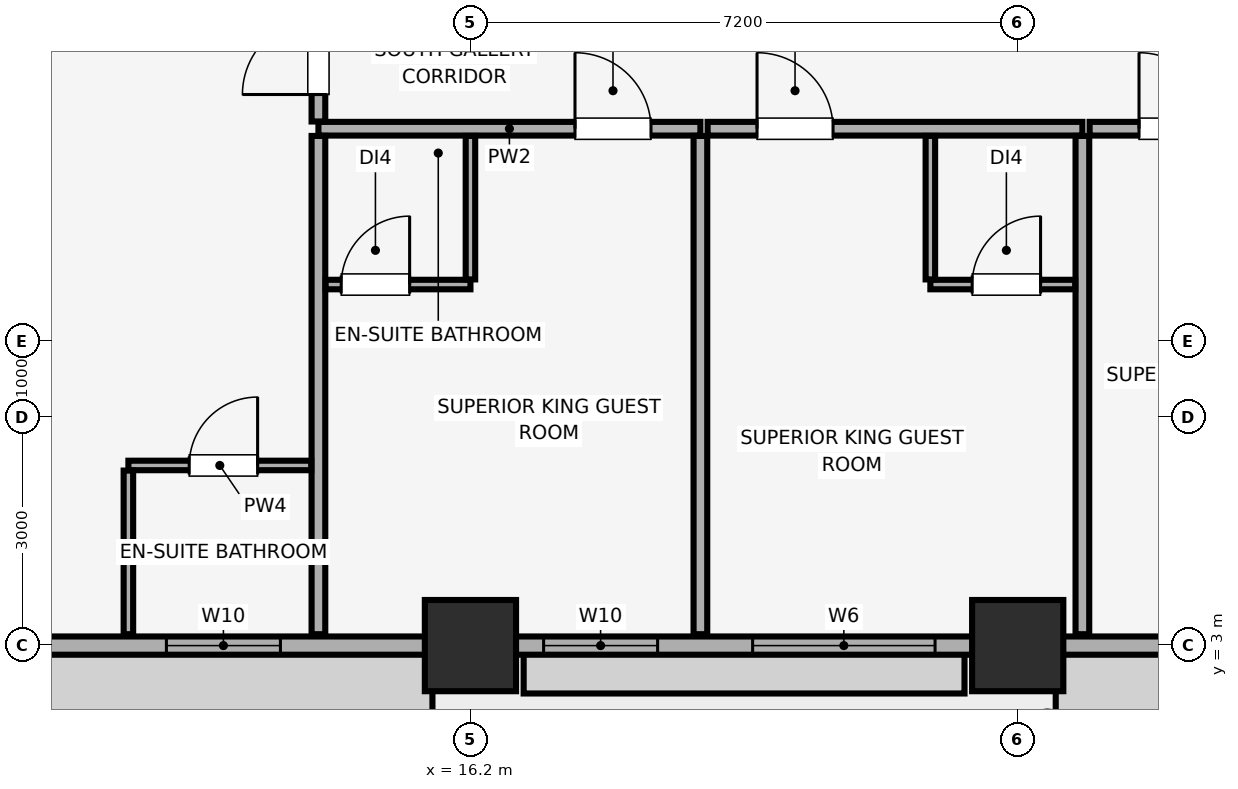
"""IFC4 building model, lengths in metres.
Left out: names, types, materials, properties, quantities, classifications, styles, units other than length and angle.
Written with IfcOpenShell. Run it as: python <this file> out.ifc"""

import sys

from ifc_helpers import new_model, si_unit, direction, frame, frame_2d, origin, origin_2d, place, context, subcontext, project, spatial, rectangle, extrude, element, fill, save


model = new_model("IFC4")
c1 = context("Model", 3, precision=1e-05, world=origin(), true_north=direction((0.0, 1.0)))
c2 = subcontext(c1, "Body", "Model", "MODEL_VIEW")
j1 = project(units=[si_unit("LENGTHUNIT", "METRE"), si_unit("PLANEANGLEUNIT", "RADIAN")], contexts=[c1])
p1 = place(None, origin())
s1 = spatial("IfcSite", under=j1, at=p1, CompositionType="ELEMENT")
p2 = place(p1, origin())
s2 = spatial("IfcBuilding", under=s1, at=p2, CompositionType="ELEMENT")
p3 = place(p2, frame((0.0, 0.0, 135.35)))
s3 = spatial("IfcBuildingStorey", under=s2, at=p3, CompositionType="ELEMENT", Elevation=135.35)
for number, where, z_axis, x_axis in (
    (1, (16.2, 3.0, 0.0), (0.0, 0.0, 1.0), (1.0, 0.0, 0.0)),
    (2, (23.4, 3.0, 0.0), (0.0, 0.0, 1.0), (1.0, 0.0, 0.0)),
):
    element("IfcColumn", number, at=place(p3, frame(where, z_axis=z_axis, x_axis=x_axis)), inside=s3, PredefinedType="COLUMN", context=c2, shape_type="SweptSolid", body=[
        extrude(rectangle(XDim=1.2, YDim=1.2, at=origin_2d()), origin(), (0.0, 0.0, 1.0), 3.56),
    ])
p4 = place(p3, frame((7.0, 3.0, 0.0), z_axis=(0.0, 0.0, 1.0), x_axis=(1.0, 0.0, 0.0)))
e3 = element("IfcWall", 3, at=p4, inside=s3, PredefinedType="SOLIDWALL", context=c2, shape_type="SweptSolid", body=[
    extrude(rectangle(XDim=70.0, YDim=0.24, at=frame_2d((35.0, 0.0))), origin(), (0.0, 0.0, 1.0), 2.61),
])
p5 = place(p4, frame((19.517, 0.0, 0.0)))
e4 = element("IfcOpeningElement", 4, at=p5, cuts=e3, PredefinedType="OPENING", context=c2, shape_type="SweptSolid", body=[
    extrude(rectangle(XDim=1.1, YDim=2.15, at=frame_2d((0.55, 1.075))), frame((0.0, 0.13, 0.0), z_axis=(0.0, -1.0, 0.0), x_axis=(1.0, 0.0, 0.0)), (0.0, 0.0, 1.0), 0.26),
])
p6 = place(p4, frame((34.45, 0.0, 0.0)))
e5 = element("IfcOpeningElement", 5, at=p6, cuts=e3, PredefinedType="OPENING", context=c2, shape_type="SweptSolid", body=[
    extrude(rectangle(XDim=1.1, YDim=2.15, at=frame_2d((0.55, 1.075))), frame((0.0, 0.13, 0.0), z_axis=(0.0, -1.0, 0.0), x_axis=(1.0, 0.0, 0.0)), (0.0, 0.0, 1.0), 0.26),
])
p7 = place(p4, frame((49.421, 0.0, 0.0)))
e6 = element("IfcOpeningElement", 6, at=p7, cuts=e3, PredefinedType="OPENING", context=c2, shape_type="SweptSolid", body=[
    extrude(rectangle(XDim=1.1, YDim=2.15, at=frame_2d((0.55, 1.075))), frame((0.0, 0.13, 0.0), z_axis=(0.0, -1.0, 0.0), x_axis=(1.0, 0.0, 0.0)), (0.0, 0.0, 1.0), 0.26),
])
p8 = place(p4, frame((5.2, 0.0, 0.85)))
e7 = element("IfcOpeningElement", 7, at=p8, cuts=e3, PredefinedType="OPENING", context=c2, shape_type="SweptSolid", body=[
    extrude(rectangle(XDim=1.5, YDim=1.4, at=frame_2d((0.75, 0.7))), frame((0.0, 0.13, 0.0), z_axis=(0.0, -1.0, 0.0), x_axis=(1.0, 0.0, 0.0)), (0.0, 0.0, 1.0), 0.26),
])
p9 = place(p4, frame((10.163, 0.0, 0.85)))
e8 = element("IfcOpeningElement", 8, at=p9, cuts=e3, PredefinedType="OPENING", context=c2, shape_type="SweptSolid", body=[
    extrude(rectangle(XDim=1.5, YDim=1.4, at=frame_2d((0.75, 0.7))), frame((0.0, 0.13, 0.0), z_axis=(0.0, -1.0, 0.0), x_axis=(1.0, 0.0, 0.0)), (0.0, 0.0, 1.0), 0.26),
])
p10 = place(p4, frame((12.913, 0.0, 0.85)))
e9 = element("IfcOpeningElement", 9, at=p10, cuts=e3, PredefinedType="OPENING", context=c2, shape_type="SweptSolid", body=[
    extrude(rectangle(XDim=2.4, YDim=1.5, at=frame_2d((1.2, 0.75))), frame((0.0, 0.13, 0.0), z_axis=(0.0, -1.0, 0.0), x_axis=(1.0, 0.0, 0.0)), (0.0, 0.0, 1.0), 0.26),
])
p11 = place(p4, frame((24.45, 0.0, 0.85)))
e10 = element("IfcOpeningElement", 10, at=p11, cuts=e3, PredefinedType="OPENING", context=c2, shape_type="SweptSolid", body=[
    extrude(rectangle(XDim=2.4, YDim=1.5, at=frame_2d((1.2, 0.75))), frame((0.0, 0.13, 0.0), z_axis=(0.0, -1.0, 0.0), x_axis=(1.0, 0.0, 0.0)), (0.0, 0.0, 1.0), 0.26),
])
p12 = place(p4, frame((28.101, 0.0, 0.85)))
e11 = element("IfcOpeningElement", 11, at=p12, cuts=e3, PredefinedType="OPENING", context=c2, shape_type="SweptSolid", body=[
    extrude(rectangle(XDim=1.5, YDim=1.4, at=frame_2d((0.75, 0.7))), frame((0.0, 0.13, 0.0), z_axis=(0.0, -1.0, 0.0), x_axis=(1.0, 0.0, 0.0)), (0.0, 0.0, 1.0), 0.26),
])
p13 = place(p4, frame((40.239, 0.0, 0.85)))
e12 = element("IfcOpeningElement", 12, at=p13, cuts=e3, PredefinedType="OPENING", context=c2, shape_type="SweptSolid", body=[
    extrude(rectangle(XDim=1.5, YDim=1.4, at=frame_2d((0.75, 0.7))), frame((0.0, 0.13, 0.0), z_axis=(0.0, -1.0, 0.0), x_axis=(1.0, 0.0, 0.0)), (0.0, 0.0, 1.0), 0.26),
])
p14 = place(p4, frame((42.989, 0.0, 0.85)))
e13 = element("IfcOpeningElement", 13, at=p14, cuts=e3, PredefinedType="OPENING", context=c2, shape_type="SweptSolid", body=[
    extrude(rectangle(XDim=2.4, YDim=1.5, at=frame_2d((1.2, 0.75))), frame((0.0, 0.13, 0.0), z_axis=(0.0, -1.0, 0.0), x_axis=(1.0, 0.0, 0.0)), (0.0, 0.0, 1.0), 0.26),
])
p15 = place(p4, frame((54.581, 0.0, 0.85)))
e14 = element("IfcOpeningElement", 14, at=p15, cuts=e3, PredefinedType="OPENING", context=c2, shape_type="SweptSolid", body=[
    extrude(rectangle(XDim=2.4, YDim=1.5, at=frame_2d((1.2, 0.75))), frame((0.0, 0.13, 0.0), z_axis=(0.0, -1.0, 0.0), x_axis=(1.0, 0.0, 0.0)), (0.0, 0.0, 1.0), 0.26),
])
p16 = place(p4, frame((58.23, 0.0, 0.85)))
e15 = element("IfcOpeningElement", 15, at=p16, cuts=e3, PredefinedType="OPENING", context=c2, shape_type="SweptSolid", body=[
    extrude(rectangle(XDim=1.5, YDim=1.4, at=frame_2d((0.75, 0.7))), frame((0.0, 0.13, 0.0), z_axis=(0.0, -1.0, 0.0), x_axis=(1.0, 0.0, 0.0)), (0.0, 0.0, 1.0), 0.26),
])
p17 = place(p4, frame((63.3, 0.0, 0.85)))
e16 = element("IfcOpeningElement", 16, at=p17, cuts=e3, PredefinedType="OPENING", context=c2, shape_type="SweptSolid", body=[
    extrude(rectangle(XDim=1.5, YDim=1.4, at=frame_2d((0.75, 0.7))), frame((0.0, 0.13, 0.0), z_axis=(0.0, -1.0, 0.0), x_axis=(1.0, 0.0, 0.0)), (0.0, 0.0, 1.0), 0.26),
])
p18 = place(p3, frame((14.2, 9.8, 0.0), z_axis=(0.0, 0.0, 1.0), x_axis=(1.0, 0.0, 0.0)))
e17 = element("IfcWall", 17, at=p18, inside=s3, PredefinedType="PARTITIONING", context=c2, shape_type="SweptSolid", body=[
    extrude(rectangle(XDim=5.025, YDim=0.18, at=frame_2d((2.513, 0.0))), origin(), (0.0, 0.0, 1.0), 3.56),
])
p19 = place(p18, frame((3.375, 0.0, 0.0)))
e18 = element("IfcOpeningElement", 18, at=p19, cuts=e17, PredefinedType="OPENING", context=c2, shape_type="SweptSolid", body=[
    extrude(rectangle(XDim=1.0, YDim=2.15, at=frame_2d((0.5, 1.075))), frame((0.0, 0.1, 0.0), z_axis=(0.0, -1.0, 0.0), x_axis=(1.0, 0.0, 0.0)), (0.0, 0.0, 1.0), 0.2),
])
for number, where, z_axis, x_axis in (
    (19, (14.2, 3.15, 0.0), (0.0, 0.0, 1.0), (0.0, 1.0, 0.0)),
    (20, (19.225, 3.15, 0.0), (0.0, 0.0, 1.0), (0.0, 1.0, 0.0)),
):
    element("IfcWall", number, at=place(p3, frame(where, z_axis=z_axis, x_axis=x_axis)), inside=s3, PredefinedType="PARTITIONING", context=c2, shape_type="SweptSolid", body=[
        extrude(rectangle(XDim=6.555, YDim=0.18, at=frame_2d((3.278, 0.0))), origin(), (0.0, 0.0, 1.0), 3.56),
    ])
p20 = place(p3, frame((14.295, 7.75, 0.0), z_axis=(0.0, 0.0, 1.0), x_axis=(1.0, 0.0, 0.0)))
e21 = element("IfcWall", 21, at=p20, inside=s3, PredefinedType="PARTITIONING", context=c2, shape_type="SweptSolid", body=[
    extrude(rectangle(XDim=1.905, YDim=0.125, at=frame_2d((0.953, 0.0))), origin(), (0.0, 0.0, 1.0), 3.56),
])
p21 = place(p20, frame((0.205, 0.0, 0.0)))
e22 = element("IfcOpeningElement", 22, at=p21, cuts=e21, PredefinedType="OPENING", context=c2, shape_type="SweptSolid", body=[
    extrude(rectangle(XDim=0.9, YDim=2.1, at=frame_2d((0.45, 1.05))), frame((0.0, 0.073, 0.0), z_axis=(0.0, -1.0, 0.0), x_axis=(1.0, 0.0, 0.0)), (0.0, 0.0, 1.0), 0.145),
])
p22 = place(p3, frame((16.2, 7.817, 0.0), z_axis=(0.0, 0.0, 1.0), x_axis=(0.0, 1.0, 0.0)))
e23 = element("IfcWall", 23, at=p22, inside=s3, PredefinedType="PARTITIONING", context=c2, shape_type="SweptSolid", body=[
    extrude(rectangle(XDim=1.888, YDim=0.125, at=frame_2d((0.944, 0.0))), origin(), (0.0, 0.0, 1.0), 3.01),
])
p23 = place(p3, frame((19.32, 9.8, 0.0), z_axis=(0.0, 0.0, 1.0), x_axis=(1.0, 0.0, 0.0)))
e24 = element("IfcWall", 24, at=p23, inside=s3, PredefinedType="PARTITIONING", context=c2, shape_type="SweptSolid", body=[
    extrude(rectangle(XDim=4.93, YDim=0.18, at=frame_2d((2.465, 0.0))), origin(), (0.0, 0.0, 1.0), 3.56),
])
p24 = place(p23, frame((0.65, 0.0, 0.0)))
e25 = element("IfcOpeningElement", 25, at=p24, cuts=e24, PredefinedType="OPENING", context=c2, shape_type="SweptSolid", body=[
    extrude(rectangle(XDim=1.0, YDim=2.15, at=frame_2d((0.5, 1.075))), frame((0.0, 0.1, 0.0), z_axis=(0.0, -1.0, 0.0), x_axis=(1.0, 0.0, 0.0)), (0.0, 0.0, 1.0), 0.2),
])
p25 = place(p3, frame((24.251, 3.15, 0.0), z_axis=(0.0, 0.0, 1.0), x_axis=(0.0, 1.0, 0.0)))
e26 = element("IfcWall", 26, at=p25, inside=s3, PredefinedType="PARTITIONING", context=c2, shape_type="SweptSolid", body=[
    extrude(rectangle(XDim=6.555, YDim=0.18, at=frame_2d((3.278, 0.0))), origin(), (0.0, 0.0, 1.0), 3.56),
])
p26 = place(p3, frame((22.251, 7.75, 0.0), z_axis=(0.0, 0.0, 1.0), x_axis=(1.0, 0.0, 0.0)))
e27 = element("IfcWall", 27, at=p26, inside=s3, PredefinedType="PARTITIONING", context=c2, shape_type="SweptSolid", body=[
    extrude(rectangle(XDim=1.905, YDim=0.125, at=frame_2d((0.953, 0.0))), origin(), (0.0, 0.0, 1.0), 3.56),
])
p27 = place(p26, frame((0.55, 0.0, 0.0)))
e28 = element("IfcOpeningElement", 28, at=p27, cuts=e27, PredefinedType="OPENING", context=c2, shape_type="SweptSolid", body=[
    extrude(rectangle(XDim=0.9, YDim=2.1, at=frame_2d((0.45, 1.05))), frame((0.0, 0.073, 0.0), z_axis=(0.0, -1.0, 0.0), x_axis=(1.0, 0.0, 0.0)), (0.0, 0.0, 1.0), 0.145),
])
p28 = place(p3, frame((22.251, 7.817, 0.0), z_axis=(0.0, 0.0, 1.0), x_axis=(0.0, 1.0, 0.0)))
e29 = element("IfcWall", 29, at=p28, inside=s3, PredefinedType="PARTITIONING", context=c2, shape_type="SweptSolid", body=[
    extrude(rectangle(XDim=1.888, YDim=0.125, at=frame_2d((0.944, 0.0))), origin(), (0.0, 0.0, 1.0), 3.56),
])
p29 = place(p3, frame((24.346, 9.8, 0.0), z_axis=(0.0, 0.0, 1.0), x_axis=(1.0, 0.0, 0.0)))
e30 = element("IfcWall", 30, at=p29, inside=s3, PredefinedType="PARTITIONING", context=c2, shape_type="SweptSolid", body=[
    extrude(rectangle(XDim=4.93, YDim=0.18, at=frame_2d((2.465, 0.0))), origin(), (0.0, 0.0, 1.0), 3.56),
])
p30 = place(p29, frame((0.65, 0.0, 0.0)))
e31 = element("IfcOpeningElement", 31, at=p30, cuts=e30, PredefinedType="OPENING", context=c2, shape_type="SweptSolid", body=[
    extrude(rectangle(XDim=1.0, YDim=2.15, at=frame_2d((0.5, 1.075))), frame((0.0, 0.1, 0.0), z_axis=(0.0, -1.0, 0.0), x_axis=(1.0, 0.0, 0.0)), (0.0, 0.0, 1.0), 0.2),
])
p31 = place(p3, frame((14.2, 9.895, 0.0), z_axis=(0.0, 0.0, 1.0), x_axis=(0.0, 1.0, 0.0)))
e32 = element("IfcWall", 32, at=p31, inside=s3, PredefinedType="PARTITIONING", context=c2, shape_type="SweptSolid", body=[
    extrude(rectangle(XDim=1.71, YDim=0.18, at=frame_2d((0.855, 0.0))), origin(), (0.0, 0.0, 1.0), 3.56),
])
p32 = place(p31, frame((0.355, 0.0, 0.0)))
e33 = element("IfcOpeningElement", 33, at=p32, cuts=e32, PredefinedType="OPENING", context=c2, shape_type="SweptSolid", body=[
    extrude(rectangle(XDim=1.0, YDim=2.15, at=frame_2d((0.5, 1.075))), frame((0.0, 0.1, 0.0), z_axis=(0.0, -1.0, 0.0), x_axis=(1.0, 0.0, 0.0)), (0.0, 0.0, 1.0), 0.2),
])
p33 = place(p3, frame((11.7, 5.37, 0.0), z_axis=(0.0, 0.0, 1.0), x_axis=(1.0, 0.0, 0.0)))
e34 = element("IfcWall", 34, at=p33, inside=s3, PredefinedType="PARTITIONING", context=c2, shape_type="SweptSolid", body=[
    extrude(rectangle(XDim=2.405, YDim=0.125, at=frame_2d((1.203, 0.0))), origin(), (0.0, 0.0, 1.0), 3.56),
])
p34 = place(p33, frame((0.8, 0.0, 0.0)))
e35 = element("IfcOpeningElement", 35, at=p34, cuts=e34, PredefinedType="OPENING", context=c2, shape_type="SweptSolid", body=[
    extrude(rectangle(XDim=0.9, YDim=2.1, at=frame_2d((0.45, 1.05))), frame((0.0, 0.073, 0.0), z_axis=(0.0, -1.0, 0.0), x_axis=(1.0, 0.0, 0.0)), (0.0, 0.0, 1.0), 0.145),
])
p35 = place(p3, frame((11.7, 3.15, 0.0), z_axis=(0.0, 0.0, 1.0), x_axis=(0.0, 1.0, 0.0)))
e36 = element("IfcWall", 36, at=p35, inside=s3, PredefinedType="PARTITIONING", context=c2, shape_type="SweptSolid", body=[
    extrude(rectangle(XDim=2.153, YDim=0.125, at=frame_2d((1.076, 0.0))), origin(), (0.0, 0.0, 1.0), 3.56),
])
p36 = place(p8, origin())
e37 = element("IfcWindow", 37, at=p36, inside=s3, PartitioningType="SINGLE_PANEL", PredefinedType="WINDOW", context=c2, shape_type="SweptSolid", body=[
    extrude(rectangle(XDim=1.5, YDim=1.4, at=frame_2d((0.75, 0.7))), frame((0.0, 0.03, 0.0), z_axis=(0.0, -1.0, 0.0), x_axis=(1.0, 0.0, 0.0)), (0.0, 0.0, 1.0), 0.06),
])
fill(e7, e37)
p37 = place(p9, origin())
e38 = element("IfcWindow", 38, at=p37, inside=s3, PartitioningType="SINGLE_PANEL", PredefinedType="WINDOW", context=c2, shape_type="SweptSolid", body=[
    extrude(rectangle(XDim=1.5, YDim=1.4, at=frame_2d((0.75, 0.7))), frame((0.0, 0.03, 0.0), z_axis=(0.0, -1.0, 0.0), x_axis=(1.0, 0.0, 0.0)), (0.0, 0.0, 1.0), 0.06),
])
fill(e8, e38)
p38 = place(p10, origin())
e39 = element("IfcWindow", 39, at=p38, inside=s3, PartitioningType="SINGLE_PANEL", PredefinedType="WINDOW", context=c2, shape_type="SweptSolid", body=[
    extrude(rectangle(XDim=2.4, YDim=1.5, at=frame_2d((1.2, 0.75))), frame((0.0, 0.03, 0.0), z_axis=(0.0, -1.0, 0.0), x_axis=(1.0, 0.0, 0.0)), (0.0, 0.0, 1.0), 0.06),
])
fill(e9, e39)
p39 = place(p19, origin())
e40 = element("IfcDoor", 40, at=p39, inside=s3, OperationType="SINGLE_SWING_LEFT", PredefinedType="DOOR", context=c2, shape_type="SweptSolid", body=[
    extrude(rectangle(XDim=1.0, YDim=2.15, at=frame_2d((0.5, 1.075))), frame((0.0, 0.025, 0.0), z_axis=(0.0, -1.0, 0.0), x_axis=(1.0, 0.0, 0.0)), (0.0, 0.0, 1.0), 0.05),
])
fill(e18, e40)
p40 = place(p21, origin())
e41 = element("IfcDoor", 41, at=p40, inside=s3, OperationType="SINGLE_SWING_RIGHT", PredefinedType="DOOR", context=c2, shape_type="SweptSolid", body=[
    extrude(rectangle(XDim=0.9, YDim=2.1, at=frame_2d((0.45, 1.05))), frame((0.0, 0.025, 0.0), z_axis=(0.0, -1.0, 0.0), x_axis=(1.0, 0.0, 0.0)), (0.0, 0.0, 1.0), 0.05),
])
fill(e22, e41)
p41 = place(p24, origin())
e42 = element("IfcDoor", 42, at=p41, inside=s3, OperationType="SINGLE_SWING_LEFT", PredefinedType="DOOR", context=c2, shape_type="SweptSolid", body=[
    extrude(rectangle(XDim=1.0, YDim=2.15, at=frame_2d((0.5, 1.075))), frame((0.0, 0.025, 0.0), z_axis=(0.0, -1.0, 0.0), x_axis=(1.0, 0.0, 0.0)), (0.0, 0.0, 1.0), 0.05),
])
fill(e25, e42)
p42 = place(p27, origin())
e43 = element("IfcDoor", 43, at=p42, inside=s3, OperationType="SINGLE_SWING_RIGHT", PredefinedType="DOOR", context=c2, shape_type="SweptSolid", body=[
    extrude(rectangle(XDim=0.9, YDim=2.1, at=frame_2d((0.45, 1.05))), frame((0.0, 0.025, 0.0), z_axis=(0.0, -1.0, 0.0), x_axis=(1.0, 0.0, 0.0)), (0.0, 0.0, 1.0), 0.05),
])
fill(e28, e43)
p43 = place(p30, origin())
e44 = element("IfcDoor", 44, at=p43, inside=s3, OperationType="SINGLE_SWING_LEFT", PredefinedType="DOOR", context=c2, shape_type="SweptSolid", body=[
    extrude(rectangle(XDim=1.0, YDim=2.15, at=frame_2d((0.5, 1.075))), frame((0.0, 0.025, 0.0), z_axis=(0.0, -1.0, 0.0), x_axis=(1.0, 0.0, 0.0)), (0.0, 0.0, 1.0), 0.05),
])
fill(e31, e44)
p44 = place(p32, origin())
e45 = element("IfcDoor", 45, at=p44, inside=s3, OperationType="SINGLE_SWING_LEFT", PredefinedType="DOOR", context=c2, shape_type="SweptSolid", body=[
    extrude(rectangle(XDim=1.0, YDim=2.15, at=frame_2d((0.5, 1.075))), frame((0.0, 0.025, 0.0), z_axis=(0.0, -1.0, 0.0), x_axis=(1.0, 0.0, 0.0)), (0.0, 0.0, 1.0), 0.05),
])
fill(e33, e45)
p45 = place(p34, origin())
e46 = element("IfcDoor", 46, at=p45, inside=s3, OperationType="SINGLE_SWING_RIGHT", PredefinedType="DOOR", context=c2, shape_type="SweptSolid", body=[
    extrude(rectangle(XDim=0.9, YDim=2.1, at=frame_2d((0.45, 1.05))), frame((0.0, 0.025, 0.0), z_axis=(0.0, -1.0, 0.0), x_axis=(1.0, 0.0, 0.0)), (0.0, 0.0, 1.0), 0.05),
])
fill(e35, e46)
save(model, sys.argv[1])
